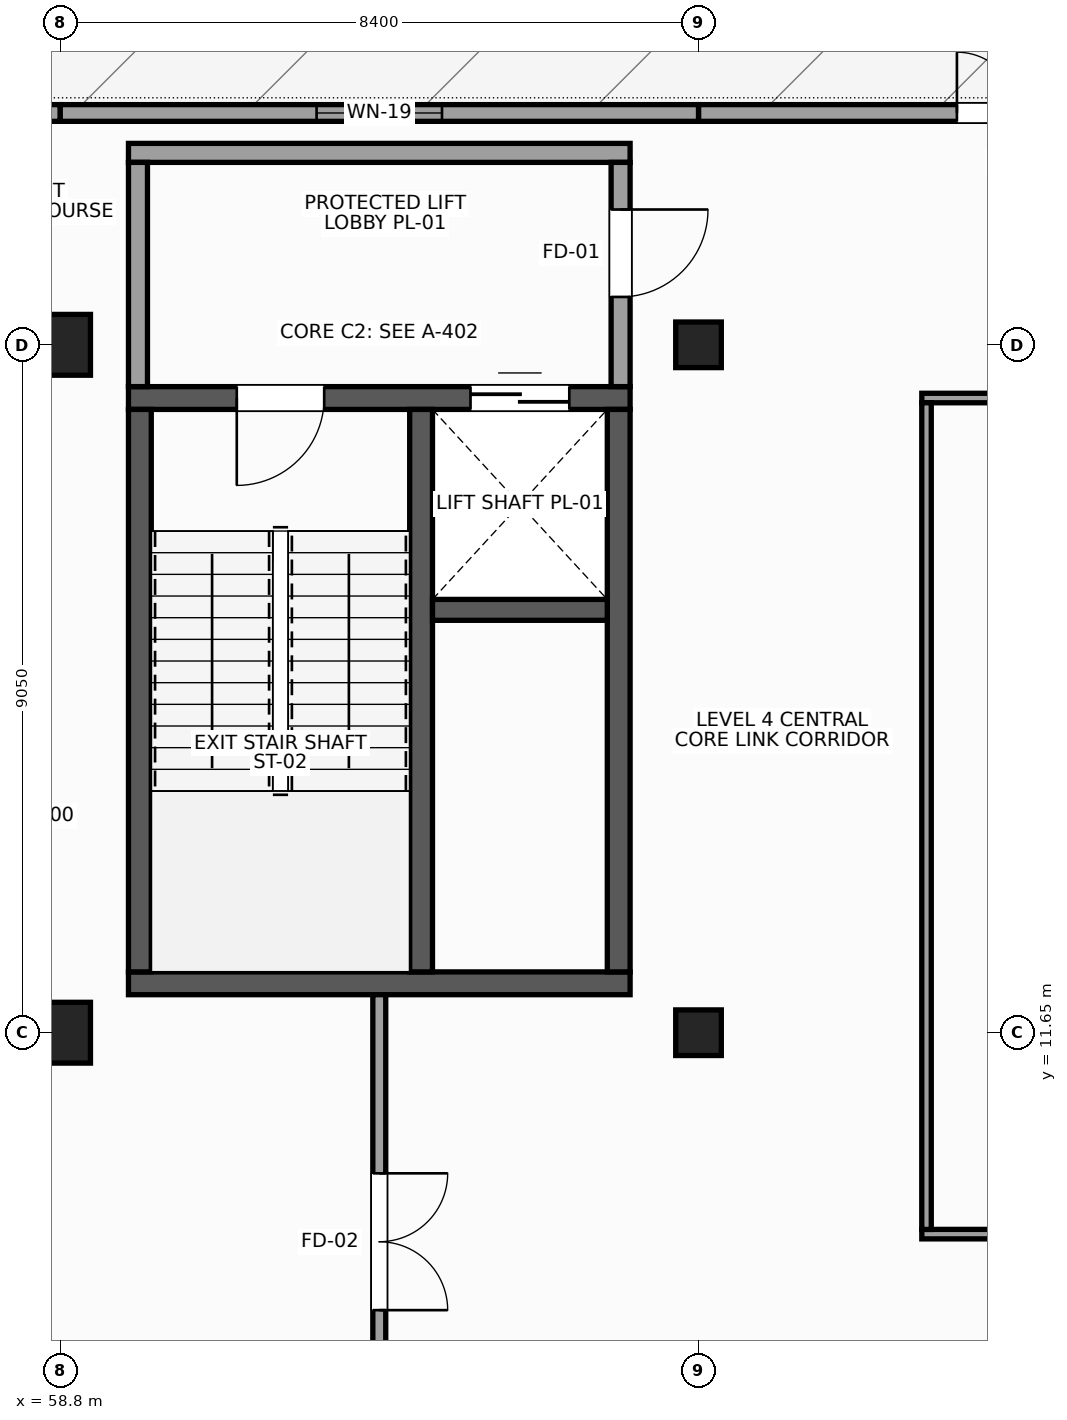
"""IFC4 building model, lengths in metres.
Left out: names, types, materials, properties, quantities, classifications, styles, units other than length and angle.
Written with IfcOpenShell. Run it as: python <this file> out.ifc"""

import sys

from ifc_helpers import new_model, si_unit, direction, frame, frame_2d, origin, origin_2d, place, context, subcontext, project, spatial, rectangle, extrude, element, fill, save


model = new_model("IFC4")
c1 = context("Model", 3, precision=1e-05, world=origin(), true_north=direction((0.0, 1.0)))
c2 = subcontext(c1, "Body", "Model", "MODEL_VIEW")
j1 = project(units=[si_unit("LENGTHUNIT", "METRE"), si_unit("PLANEANGLEUNIT", "RADIAN")], contexts=[c1])
p1 = place(None, origin())
s1 = spatial("IfcSite", under=j1, at=p1, CompositionType="ELEMENT")
p2 = place(p1, origin())
s2 = spatial("IfcBuilding", under=s1, at=p2, CompositionType="ELEMENT")
p3 = place(p2, frame((0.0, 0.0, 20.1)))
s3 = spatial("IfcBuildingStorey", under=s2, at=p3, CompositionType="ELEMENT", Elevation=20.1)
p4 = place(p3, frame((58.8, 11.65, 0.0), z_axis=(0.0, 0.0, 1.0), x_axis=(1.0, 0.0, 0.0)))
e1 = element("IfcColumn", 1, at=p4, inside=s3, PredefinedType="COLUMN", context=c2, shape_type="SweptSolid", body=[
    extrude(rectangle(XDim=0.8, YDim=0.8, at=origin_2d()), origin(), (0.0, 0.0, 1.0), 3.75),
])
p5 = place(p3, frame((58.8, 20.7, 0.0), z_axis=(0.0, 0.0, 1.0), x_axis=(1.0, 0.0, 0.0)))
e2 = element("IfcColumn", 2, at=p5, inside=s3, PredefinedType="COLUMN", context=c2, shape_type="SweptSolid", body=[
    extrude(rectangle(XDim=0.8, YDim=0.8, at=origin_2d()), origin(), (0.0, 0.0, 1.0), 4.2),
])
for number, where, z_axis, x_axis in (
    (3, (67.2, 11.65, 0.0), (0.0, 0.0, 1.0), (1.0, 0.0, 0.0)),
    (4, (67.2, 20.7, 0.0), (0.0, 0.0, 1.0), (1.0, 0.0, 0.0)),
):
    element("IfcColumn", number, at=place(p3, frame(where, z_axis=z_axis, x_axis=x_axis)), inside=s3, PredefinedType="COLUMN", context=c2, shape_type="SweptSolid", body=[
        extrude(rectangle(XDim=0.6, YDim=0.6, at=origin_2d()), origin(), (0.0, 0.0, 1.0), 4.5),
    ])
p6 = place(p3, frame((75.6, 23.75, 0.0), z_axis=(0.0, 0.0, 1.0), x_axis=(-1.0, 0.0, 0.0)))
e5 = element("IfcWall", 5, at=p6, inside=s3, PredefinedType="STANDARD", context=c2, shape_type="SweptSolid", body=[
    extrude(rectangle(XDim=8.4, YDim=0.22, at=frame_2d((4.2, 0.0))), origin(), (0.0, 0.0, 1.0), 3.428),
])
p7 = place(p6, frame((3.4, 0.0, 0.0)))
e6 = element("IfcOpeningElement", 6, at=p7, cuts=e5, PredefinedType="OPENING", context=c2, shape_type="SweptSolid", body=[
    extrude(rectangle(XDim=1.6, YDim=2.25, at=frame_2d((0.8, 1.125))), frame((0.0, 0.12, 0.0), z_axis=(0.0, -1.0, 0.0), x_axis=(1.0, 0.0, 0.0)), (0.0, 0.0, 1.0), 0.24),
])
p8 = place(p3, frame((67.2, 23.75, 0.0), z_axis=(0.0, 0.0, 1.0), x_axis=(-1.0, 0.0, 0.0)))
e7 = element("IfcWall", 7, at=p8, inside=s3, PredefinedType="STANDARD", context=c2, shape_type="SweptSolid", body=[
    extrude(rectangle(XDim=8.4, YDim=0.22, at=frame_2d((4.2, 0.0))), origin(), (0.0, 0.0, 1.0), 3.428),
])
p9 = place(p8, frame((3.375, 0.0, 0.95)))
e8 = element("IfcOpeningElement", 8, at=p9, cuts=e7, PredefinedType="OPENING", context=c2, shape_type="SweptSolid", body=[
    extrude(rectangle(XDim=1.65, YDim=1.85, at=frame_2d((0.825, 0.925))), frame((0.0, 0.12, 0.0), z_axis=(0.0, -1.0, 0.0), x_axis=(1.0, 0.0, 0.0)), (0.0, 0.0, 1.0), 0.24),
])
p10 = place(p3, frame((58.8, 23.75, 0.0), z_axis=(0.0, 0.0, 1.0), x_axis=(-1.0, 0.0, 0.0)))
e9 = element("IfcWall", 9, at=p10, inside=s3, PredefinedType="STANDARD", context=c2, shape_type="SweptSolid", body=[
    extrude(rectangle(XDim=8.4, YDim=0.22, at=frame_2d((4.2, 0.0))), origin(), (0.0, 0.0, 1.0), 3.428),
])
p11 = place(p10, frame((3.4, 0.0, 0.0)))
e10 = element("IfcOpeningElement", 10, at=p11, cuts=e9, PredefinedType="OPENING", context=c2, shape_type="SweptSolid", body=[
    extrude(rectangle(XDim=1.6, YDim=2.25, at=frame_2d((0.8, 1.125))), frame((0.0, 0.12, 0.0), z_axis=(0.0, -1.0, 0.0), x_axis=(1.0, 0.0, 0.0)), (0.0, 0.0, 1.0), 0.24),
])
p12 = place(p3, frame((59.7, 12.3, 0.0), z_axis=(0.0, 0.0, 1.0), x_axis=(1.0, 0.0, 0.0)))
e11 = element("IfcWall", 11, at=p12, inside=s3, PredefinedType="SHEAR", context=c2, shape_type="SweptSolid", body=[
    extrude(rectangle(XDim=6.6, YDim=0.3, at=frame_2d((3.3, 0.0))), origin(), (0.0, 0.0, 1.0), 4.2),
])
p13 = place(p3, frame((59.7, 20.0, 0.0), z_axis=(0.0, 0.0, 1.0), x_axis=(1.0, 0.0, 0.0)))
e12 = element("IfcWall", 12, at=p13, inside=s3, PredefinedType="SHEAR", context=c2, shape_type="SweptSolid", body=[
    extrude(rectangle(XDim=6.6, YDim=0.3, at=frame_2d((3.3, 0.0))), origin(), (0.0, 0.0, 1.0), 4.2),
])
p14 = place(p13, frame((1.425, 0.0, 0.0)))
e13 = element("IfcOpeningElement", 13, at=p14, cuts=e12, PredefinedType="OPENING", context=c2, shape_type="SweptSolid", body=[
    extrude(rectangle(XDim=1.15, YDim=2.2, at=frame_2d((0.575, 1.1))), frame((0.0, 0.16, 0.0), z_axis=(0.0, -1.0, 0.0), x_axis=(1.0, 0.0, 0.0)), (0.0, 0.0, 1.0), 0.32),
])
p15 = place(p13, frame((4.5, 0.0, 0.0)))
e14 = element("IfcOpeningElement", 14, at=p15, cuts=e12, PredefinedType="OPENING", context=c2, shape_type="SweptSolid", body=[
    extrude(rectangle(XDim=1.3, YDim=2.2, at=frame_2d((0.65, 1.1))), frame((0.0, 0.16, 0.0), z_axis=(0.0, -1.0, 0.0), x_axis=(1.0, 0.0, 0.0)), (0.0, 0.0, 1.0), 0.32),
])
for number, where, z_axis, x_axis in (
    (15, (59.85, 12.45, 0.0), (0.0, 0.0, 1.0), (0.0, 1.0, 0.0)),
    (16, (66.15, 12.45, 0.0), (0.0, 0.0, 1.0), (0.0, 1.0, 0.0)),
    (17, (63.55, 12.45, 0.0), (0.0, 0.0, 1.0), (0.0, 1.0, 0.0)),
):
    element("IfcWall", number, at=place(p3, frame(where, z_axis=z_axis, x_axis=x_axis)), inside=s3, PredefinedType="SHEAR", context=c2, shape_type="SweptSolid", body=[
        extrude(rectangle(XDim=7.4, YDim=0.3, at=frame_2d((3.7, 0.0))), origin(), (0.0, 0.0, 1.0), 4.2),
    ])
p16 = place(p3, frame((63.7, 17.213, 0.0), z_axis=(0.0, 0.0, 1.0), x_axis=(1.0, 0.0, 0.0)))
e18 = element("IfcWall", 18, at=p16, inside=s3, PredefinedType="SHEAR", context=c2, shape_type="SweptSolid", body=[
    extrude(rectangle(XDim=2.3, YDim=0.275, at=frame_2d((1.15, 0.0))), origin(), (0.0, 0.0, 1.0), 4.2),
])
p17 = place(p3, frame((59.7, 23.225, 0.0), z_axis=(0.0, 0.0, 1.0), x_axis=(1.0, 0.0, 0.0)))
e19 = element("IfcWall", 19, at=p17, inside=s3, PredefinedType="PARTITIONING", context=c2, shape_type="SweptSolid", body=[
    extrude(rectangle(XDim=6.6, YDim=0.25, at=frame_2d((3.3, 0.0))), origin(), (0.0, 0.0, 1.0), 4.2),
])
p18 = place(p3, frame((59.825, 20.15, 0.0), z_axis=(0.0, 0.0, 1.0), x_axis=(0.0, 1.0, 0.0)))
e20 = element("IfcWall", 20, at=p18, inside=s3, PredefinedType="PARTITIONING", context=c2, shape_type="SweptSolid", body=[
    extrude(rectangle(XDim=2.95, YDim=0.25, at=frame_2d((1.475, 0.0))), origin(), (0.0, 0.0, 1.0), 4.2),
])
p19 = place(p3, frame((66.175, 20.15, 0.0), z_axis=(0.0, 0.0, 1.0), x_axis=(0.0, 1.0, 0.0)))
e21 = element("IfcWall", 21, at=p19, inside=s3, PredefinedType="PARTITIONING", context=c2, shape_type="SweptSolid", body=[
    extrude(rectangle(XDim=2.95, YDim=0.25, at=frame_2d((1.475, 0.0))), origin(), (0.0, 0.0, 1.0), 3.783),
])
p20 = place(p19, frame((1.18, 0.0, 0.0)))
e22 = element("IfcOpeningElement", 22, at=p20, cuts=e21, PredefinedType="OPENING", context=c2, shape_type="SweptSolid", body=[
    extrude(rectangle(XDim=1.15, YDim=2.2, at=frame_2d((0.575, 1.1))), frame((0.0, 0.135, 0.0), z_axis=(0.0, -1.0, 0.0), x_axis=(1.0, 0.0, 0.0)), (0.0, 0.0, 1.0), 0.27),
])
p21 = place(p3, frame((63.0, 5.65, 0.0), z_axis=(0.0, 0.0, 1.0), x_axis=(0.0, 1.0, 0.0)))
e23 = element("IfcWall", 23, at=p21, inside=s3, PredefinedType="PARTITIONING", context=c2, shape_type="SweptSolid", body=[
    extrude(rectangle(XDim=6.5, YDim=0.17, at=frame_2d((3.25, 0.0))), origin(), (0.0, 0.0, 1.0), 3.75),
])
p22 = place(p21, frame((2.35, 0.0, 0.0)))
e24 = element("IfcOpeningElement", 24, at=p22, cuts=e23, PredefinedType="OPENING", context=c2, shape_type="SweptSolid", body=[
    extrude(rectangle(XDim=1.8, YDim=2.25, at=frame_2d((0.9, 1.125))), frame((0.0, 0.095, 0.0), z_axis=(0.0, -1.0, 0.0), x_axis=(1.0, 0.0, 0.0)), (0.0, 0.0, 1.0), 0.19),
])
p23 = place(p3, frame((70.138, 9.0, 0.0), z_axis=(0.0, 0.0, 1.0), x_axis=(1.0, 0.0, 0.0)))
e25 = element("IfcWall", 25, at=p23, inside=s3, PredefinedType="PARTITIONING", context=c2, shape_type="SweptSolid", body=[
    extrude(rectangle(XDim=21.924, YDim=0.125, at=frame_2d((10.962, 0.0))), origin(), (0.0, 0.0, 1.0), 4.2),
])
p24 = place(p23, frame((10.292, 0.0, 0.0)))
e26 = element("IfcOpeningElement", 26, at=p24, cuts=e25, PredefinedType="OPENING", context=c2, shape_type="SweptSolid", body=[
    extrude(rectangle(XDim=1.34, YDim=2.32, at=frame_2d((0.67, 1.16))), frame((0.0, 0.073, 0.0), z_axis=(0.0, -1.0, 0.0), x_axis=(1.0, 0.0, 0.0)), (0.0, 0.0, 1.0), 0.145),
])
p25 = place(p23, frame((12.232, 0.0, 1.05)))
e27 = element("IfcOpeningElement", 27, at=p25, cuts=e25, PredefinedType="OPENING", context=c2, shape_type="SweptSolid", body=[
    extrude(rectangle(XDim=2.25, YDim=1.6, at=frame_2d((1.125, 0.8))), frame((0.0, 0.073, 0.0), z_axis=(0.0, -1.0, 0.0), x_axis=(1.0, 0.0, 0.0)), (0.0, 0.0, 1.0), 0.145),
])
p26 = place(p3, frame((70.138, 20.0, 0.0), z_axis=(0.0, 0.0, 1.0), x_axis=(1.0, 0.0, 0.0)))
e28 = element("IfcWall", 28, at=p26, inside=s3, PredefinedType="PARTITIONING", context=c2, shape_type="SweptSolid", body=[
    extrude(rectangle(XDim=21.924, YDim=0.125, at=frame_2d((10.962, 0.0))), origin(), (0.0, 0.0, 1.0), 3.428),
])
p27 = place(p3, frame((70.2, 9.062, 0.0), z_axis=(0.0, 0.0, 1.0), x_axis=(0.0, 1.0, 0.0)))
e29 = element("IfcWall", 29, at=p27, inside=s3, PredefinedType="PARTITIONING", context=c2, shape_type="SweptSolid", body=[
    extrude(rectangle(XDim=10.876, YDim=0.125, at=frame_2d((5.438, 0.0))), origin(), (0.0, 0.0, 1.0), 3.75),
])
p28 = place(p7, frame((1.6, 0.0, 0.0), z_axis=(0.0, 0.0, 1.0), x_axis=(-1.0, 0.0, 0.0)))
e30 = element("IfcDoor", 30, at=p28, inside=s3, OperationType="DOUBLE_DOOR_SINGLE_SWING", PredefinedType="DOOR", context=c2, shape_type="SweptSolid", body=[
    extrude(rectangle(XDim=1.6, YDim=2.25, at=frame_2d((0.8, 1.125))), frame((0.0, 0.025, 0.0), z_axis=(0.0, -1.0, 0.0), x_axis=(1.0, 0.0, 0.0)), (0.0, 0.0, 1.0), 0.05),
])
fill(e6, e30)
p29 = place(p9, origin())
e31 = element("IfcWindow", 31, at=p29, inside=s3, PartitioningType="SINGLE_PANEL", PredefinedType="WINDOW", context=c2, shape_type="SweptSolid", body=[
    extrude(rectangle(XDim=1.65, YDim=1.85, at=frame_2d((0.825, 0.925))), frame((0.0, 0.03, 0.0), z_axis=(0.0, -1.0, 0.0), x_axis=(1.0, 0.0, 0.0)), (0.0, 0.0, 1.0), 0.06),
])
fill(e8, e31)
p30 = place(p14, frame((1.15, 0.0, 0.0), z_axis=(0.0, 0.0, 1.0), x_axis=(-1.0, 0.0, 0.0)))
e32 = element("IfcDoor", 32, at=p30, inside=s3, OperationType="SINGLE_SWING_RIGHT", PredefinedType="DOOR", context=c2, shape_type="SweptSolid", body=[
    extrude(rectangle(XDim=1.15, YDim=2.2, at=frame_2d((0.575, 1.1))), frame((0.0, 0.025, 0.0), z_axis=(0.0, -1.0, 0.0), x_axis=(1.0, 0.0, 0.0)), (0.0, 0.0, 1.0), 0.05),
])
fill(e13, e32)
p31 = place(p15, origin())
e33 = element("IfcDoor", 33, at=p31, inside=s3, OperationType="DOUBLE_DOOR_SLIDING", PredefinedType="DOOR", context=c2, shape_type="SweptSolid", body=[
    extrude(rectangle(XDim=1.3, YDim=2.2, at=frame_2d((0.65, 1.1))), frame((0.0, 0.025, 0.0), z_axis=(0.0, -1.0, 0.0), x_axis=(1.0, 0.0, 0.0)), (0.0, 0.0, 1.0), 0.05),
])
fill(e14, e33)
p32 = place(p20, frame((1.15, 0.0, 0.0), z_axis=(0.0, 0.0, 1.0), x_axis=(-1.0, 0.0, 0.0)))
e34 = element("IfcDoor", 34, at=p32, inside=s3, OperationType="SINGLE_SWING_LEFT", PredefinedType="DOOR", context=c2, shape_type="SweptSolid", body=[
    extrude(rectangle(XDim=1.15, YDim=2.2, at=frame_2d((0.575, 1.1))), frame((0.0, 0.025, 0.0), z_axis=(0.0, -1.0, 0.0), x_axis=(1.0, 0.0, 0.0)), (0.0, 0.0, 1.0), 0.05),
])
fill(e22, e34)
p33 = place(p22, frame((1.8, 0.0, 0.0), z_axis=(0.0, 0.0, 1.0), x_axis=(-1.0, 0.0, 0.0)))
e35 = element("IfcDoor", 35, at=p33, inside=s3, OperationType="DOUBLE_DOOR_SINGLE_SWING", PredefinedType="DOOR", context=c2, shape_type="SweptSolid", body=[
    extrude(rectangle(XDim=1.8, YDim=2.25, at=frame_2d((0.9, 1.125))), frame((0.0, 0.025, 0.0), z_axis=(0.0, -1.0, 0.0), x_axis=(1.0, 0.0, 0.0)), (0.0, 0.0, 1.0), 0.05),
])
fill(e24, e35)
save(model, sys.argv[1])
